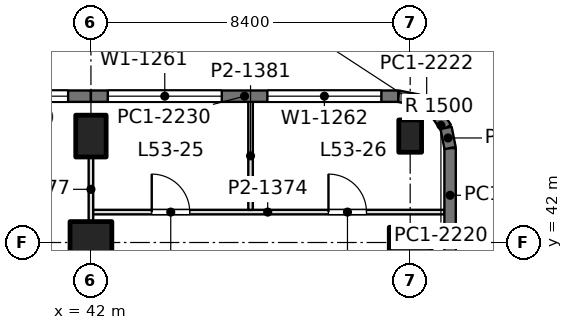
"""IFC4 building model, lengths in metres.
Left out: names, types, materials, properties, quantities, classifications, styles, units other than length and angle.
Written with IfcOpenShell. Run it as: python <this file> out.ifc"""

import sys

from ifc_helpers import new_model, si_unit, direction, frame, frame_2d, origin, origin_2d, place, context, subcontext, project, spatial, rectangle, extrude, element, fill, save


model = new_model("IFC4")
c1 = context("Model", 3, precision=1e-05, world=origin(), true_north=direction((0.0, 1.0)))
c2 = subcontext(c1, "Body", "Model", "MODEL_VIEW")
j1 = project(units=[si_unit("LENGTHUNIT", "METRE"), si_unit("PLANEANGLEUNIT", "RADIAN")], contexts=[c1])
p1 = place(None, origin())
s1 = spatial("IfcSite", under=j1, at=p1, CompositionType="ELEMENT")
p2 = place(p1, origin())
s2 = spatial("IfcBuilding", under=s1, at=p2, CompositionType="ELEMENT")
p3 = place(p2, frame((0.0, 0.0, 232.2)))
s3 = spatial("IfcBuildingStorey", under=s2, at=p3, CompositionType="ELEMENT", Elevation=232.2)
p4 = place(p3, frame((42.0, 42.0, 0.0), z_axis=(0.0, 0.0, 1.0), x_axis=(1.0, 0.0, 0.0)))
e1 = element("IfcColumn", 1, at=p4, inside=s3, PredefinedType="COLUMN", context=c2, shape_type="SweptSolid", body=[
    extrude(rectangle(XDim=1.1, YDim=1.1, at=origin_2d()), origin(), (0.0, 0.0, 1.0), 4.2),
])
for number, where, z_axis, x_axis in (
    (2, (42.0, 44.8, 0.0), (0.0, 0.0, 1.0), (1.0, 0.0, 0.0)),
    (3, (50.4, 42.0, 0.0), (0.0, 0.0, 1.0), (0.0, 1.0, 0.0)),
):
    element("IfcColumn", number, at=place(p3, frame(where, z_axis=z_axis, x_axis=x_axis)), inside=s3, PredefinedType="COLUMN", context=c2, shape_type="SweptSolid", body=[
        extrude(rectangle(XDim=0.8, YDim=1.1, at=origin_2d()), origin(), (0.0, 0.0, 1.0), 4.2),
    ])
p5 = place(p3, frame((50.4, 44.8, 0.0), z_axis=(0.0, 0.0, 1.0), x_axis=(1.0, 0.0, 0.0)))
e4 = element("IfcColumn", 4, at=p5, inside=s3, PredefinedType="COLUMN", context=c2, shape_type="SweptSolid", body=[
    extrude(rectangle(XDim=0.6, YDim=0.85, at=origin_2d()), origin(), (0.0, 0.0, 1.0), 4.2),
])
p6 = place(p3, frame((33.6, 45.85, 0.0), z_axis=(0.0, 0.0, 1.0), x_axis=(1.0, 0.0, 0.0)))
e5 = element("IfcWall", 5, at=p6, inside=s3, PredefinedType="SOLIDWALL", context=c2, shape_type="SweptSolid", body=[
    extrude(rectangle(XDim=8.4, YDim=0.3, at=frame_2d((4.2, 0.0))), origin(), (0.0, 0.0, 1.0), 4.05),
])
p7 = place(p6, frame((0.6, 0.0, 0.9)))
e6 = element("IfcOpeningElement", 6, at=p7, cuts=e5, PredefinedType="OPENING", context=c2, shape_type="SweptSolid", body=[
    extrude(rectangle(XDim=3.0, YDim=1.9, at=frame_2d((1.5, 0.95))), frame((0.0, 0.16, 0.0), z_axis=(0.0, -1.0, 0.0), x_axis=(1.0, 0.0, 0.0)), (0.0, 0.0, 1.0), 0.32),
])
p8 = place(p6, frame((4.8, 0.0, 0.9)))
e7 = element("IfcOpeningElement", 7, at=p8, cuts=e5, PredefinedType="OPENING", context=c2, shape_type="SweptSolid", body=[
    extrude(rectangle(XDim=3.0, YDim=1.9, at=frame_2d((1.5, 0.95))), frame((0.0, 0.16, 0.0), z_axis=(0.0, -1.0, 0.0), x_axis=(1.0, 0.0, 0.0)), (0.0, 0.0, 1.0), 0.32),
])
p9 = place(p3, frame((42.0, 45.85, 0.0), z_axis=(0.0, 0.0, 1.0), x_axis=(1.0, 0.0, 0.0)))
e8 = element("IfcWall", 8, at=p9, inside=s3, PredefinedType="SOLIDWALL", context=c2, shape_type="SweptSolid", body=[
    extrude(rectangle(XDim=8.085, YDim=0.3, at=frame_2d((4.042, 0.0))), origin(), (0.0, 0.0, 1.0), 4.05),
])
p10 = place(p9, frame((0.443, 0.0, 0.9)))
e9 = element("IfcOpeningElement", 9, at=p10, cuts=e8, PredefinedType="OPENING", context=c2, shape_type="SweptSolid", body=[
    extrude(rectangle(XDim=3.0, YDim=1.9, at=frame_2d((1.5, 0.95))), frame((0.0, 0.16, 0.0), z_axis=(0.0, -1.0, 0.0), x_axis=(1.0, 0.0, 0.0)), (0.0, 0.0, 1.0), 0.32),
])
p11 = place(p9, frame((4.643, 0.0, 0.9)))
e10 = element("IfcOpeningElement", 10, at=p11, cuts=e8, PredefinedType="OPENING", context=c2, shape_type="SweptSolid", body=[
    extrude(rectangle(XDim=3.0, YDim=1.9, at=frame_2d((1.5, 0.95))), frame((0.0, 0.16, 0.0), z_axis=(0.0, -1.0, 0.0), x_axis=(1.0, 0.0, 0.0)), (0.0, 0.0, 1.0), 0.32),
])
p12 = place(p3, frame((50.085, 45.85, 0.0), z_axis=(0.0, 0.0, 1.0), x_axis=(0.980702050465, -0.1955082817, 0.0)))
e11 = element("IfcWall", 11, at=p12, inside=s3, PredefinedType="SOLIDWALL", context=c2, shape_type="SweptSolid", body=[
    extrude(rectangle(XDim=0.541, YDim=0.3, at=frame_2d((0.271, 0.0))), origin(), (0.0, 0.0, 1.0), 4.05),
])
p13 = place(p3, frame((50.615, 45.744, 0.0), z_axis=(0.0, 0.0, 1.0), x_axis=(0.831692711774, -0.555236195849, 0.0)))
e12 = element("IfcWall", 12, at=p13, inside=s3, PredefinedType="SOLIDWALL", context=c2, shape_type="SweptSolid", body=[
    extrude(rectangle(XDim=0.525, YDim=0.3, at=frame_2d((0.263, 0.0))), origin(), (0.0, 0.0, 1.0), 4.05),
])
p14 = place(p3, frame((51.052, 45.453, 0.0), z_axis=(0.0, 0.0, 1.0), x_axis=(0.55534295404, -0.831621430339, 0.0)))
e13 = element("IfcWall", 13, at=p14, inside=s3, PredefinedType="SOLIDWALL", context=c2, shape_type="SweptSolid", body=[
    extrude(rectangle(XDim=0.526, YDim=0.3, at=frame_2d((0.263, 0.0))), origin(), (0.0, 0.0, 1.0), 4.05),
])
p15 = place(p3, frame((51.344, 45.015, 0.0), z_axis=(0.0, 0.0, 1.0), x_axis=(0.195073962632, -0.980788534345, 0.0)))
e14 = element("IfcWall", 14, at=p15, inside=s3, PredefinedType="SOLIDWALL", context=c2, shape_type="SweptSolid", body=[
    extrude(rectangle(XDim=0.541, YDim=0.3, at=frame_2d((0.271, 0.0))), origin(), (0.0, 0.0, 1.0), 4.05),
])
p16 = place(p3, frame((51.45, 44.485, 0.0), z_axis=(0.0, 0.0, 1.0), x_axis=(0.0, -1.0, 0.0)))
e15 = element("IfcWall", 15, at=p16, inside=s3, PredefinedType="SOLIDWALL", context=c2, shape_type="SweptSolid", body=[
    extrude(rectangle(XDim=2.485, YDim=0.3, at=frame_2d((1.243, 0.0))), origin(), (0.0, 0.0, 1.0), 4.05),
])
p17 = place(p3, frame((51.45, 42.0, 0.0), z_axis=(0.0, 0.0, 1.0), x_axis=(0.0, -1.0, 0.0)))
e16 = element("IfcWall", 16, at=p17, inside=s3, PredefinedType="SOLIDWALL", context=c2, shape_type="SweptSolid", body=[
    extrude(rectangle(XDim=4.275, YDim=0.3, at=frame_2d((2.137, 0.0))), origin(), (0.0, 0.0, 1.0), 4.05),
])
p18 = place(p17, frame((0.938, 0.0, 0.9)))
e17 = element("IfcOpeningElement", 17, at=p18, cuts=e16, PredefinedType="OPENING", context=c2, shape_type="SweptSolid", body=[
    extrude(rectangle(XDim=2.4, YDim=1.9, at=frame_2d((1.2, 0.95))), frame((0.0, 0.16, 0.0), z_axis=(0.0, -1.0, 0.0), x_axis=(1.0, 0.0, 0.0)), (0.0, 0.0, 1.0), 0.32),
])
p19 = place(p3, frame((42.0, 42.8, 0.0), z_axis=(0.0, 0.0, 1.0), x_axis=(1.0, 0.0, 0.0)))
e18 = element("IfcWall", 18, at=p19, inside=s3, PredefinedType="PARTITIONING", context=c2, shape_type="SweptSolid", body=[
    extrude(rectangle(XDim=9.302, YDim=0.12, at=frame_2d((4.651, 0.0))), origin(), (0.0, 0.0, 1.0), 3.56),
])
p20 = place(p19, frame((1.6, 0.0, 0.0)))
e19 = element("IfcOpeningElement", 19, at=p20, cuts=e18, PredefinedType="OPENING", context=c2, shape_type="SweptSolid", body=[
    extrude(rectangle(XDim=1.0, YDim=2.4, at=frame_2d((0.5, 1.2))), frame((0.0, 0.07, 0.0), z_axis=(0.0, -1.0, 0.0), x_axis=(1.0, 0.0, 0.0)), (0.0, 0.0, 1.0), 0.14),
])
p21 = place(p19, frame((6.25, 0.0, 0.0)))
e20 = element("IfcOpeningElement", 20, at=p21, cuts=e18, PredefinedType="OPENING", context=c2, shape_type="SweptSolid", body=[
    extrude(rectangle(XDim=1.0, YDim=2.4, at=frame_2d((0.5, 1.2))), frame((0.0, 0.07, 0.0), z_axis=(0.0, -1.0, 0.0), x_axis=(1.0, 0.0, 0.0)), (0.0, 0.0, 1.0), 0.14),
])
p22 = place(p3, frame((42.0, 42.548, 0.0), z_axis=(0.0, 0.0, 1.0), x_axis=(0.0, 1.0, 0.0)))
e21 = element("IfcWall", 21, at=p22, inside=s3, PredefinedType="PARTITIONING", context=c2, shape_type="SweptSolid", body=[
    extrude(rectangle(XDim=1.703, YDim=0.12, at=frame_2d((0.852, 0.0))), origin(), (0.0, 0.0, 1.0), 3.69),
])
p23 = place(p3, frame((46.2, 42.858, 0.0), z_axis=(0.0, 0.0, 1.0), x_axis=(0.0, 1.0, 0.0)))
e22 = element("IfcWall", 22, at=p23, inside=s3, PredefinedType="PARTITIONING", context=c2, shape_type="SweptSolid", body=[
    extrude(rectangle(XDim=2.844, YDim=0.12, at=frame_2d((1.422, 0.0))), origin(), (0.0, 0.0, 1.0), 3.56),
])
p24 = place(p8, origin())
e23 = element("IfcWindow", 23, at=p24, inside=s3, PartitioningType="SINGLE_PANEL", PredefinedType="WINDOW", context=c2, shape_type="SweptSolid", body=[
    extrude(rectangle(XDim=3.0, YDim=1.9, at=frame_2d((1.5, 0.95))), frame((0.0, 0.03, 0.0), z_axis=(0.0, -1.0, 0.0), x_axis=(1.0, 0.0, 0.0)), (0.0, 0.0, 1.0), 0.06),
])
fill(e7, e23)
p25 = place(p10, origin())
e24 = element("IfcWindow", 24, at=p25, inside=s3, PartitioningType="SINGLE_PANEL", PredefinedType="WINDOW", context=c2, shape_type="SweptSolid", body=[
    extrude(rectangle(XDim=3.0, YDim=1.9, at=frame_2d((1.5, 0.95))), frame((0.0, 0.03, 0.0), z_axis=(0.0, -1.0, 0.0), x_axis=(1.0, 0.0, 0.0)), (0.0, 0.0, 1.0), 0.06),
])
fill(e9, e24)
p26 = place(p11, origin())
e25 = element("IfcWindow", 25, at=p26, inside=s3, PartitioningType="SINGLE_PANEL", PredefinedType="WINDOW", context=c2, shape_type="SweptSolid", body=[
    extrude(rectangle(XDim=3.0, YDim=1.9, at=frame_2d((1.5, 0.95))), frame((0.0, 0.03, 0.0), z_axis=(0.0, -1.0, 0.0), x_axis=(1.0, 0.0, 0.0)), (0.0, 0.0, 1.0), 0.06),
])
fill(e10, e25)
p27 = place(p20, origin())
e26 = element("IfcDoor", 26, at=p27, inside=s3, OperationType="SINGLE_SWING_LEFT", PredefinedType="DOOR", context=c2, shape_type="SweptSolid", body=[
    extrude(rectangle(XDim=1.0, YDim=2.4, at=frame_2d((0.5, 1.2))), frame((0.0, 0.025, 0.0), z_axis=(0.0, -1.0, 0.0), x_axis=(1.0, 0.0, 0.0)), (0.0, 0.0, 1.0), 0.05),
])
fill(e19, e26)
p28 = place(p21, origin())
e27 = element("IfcDoor", 27, at=p28, inside=s3, OperationType="SINGLE_SWING_LEFT", PredefinedType="DOOR", context=c2, shape_type="SweptSolid", body=[
    extrude(rectangle(XDim=1.0, YDim=2.4, at=frame_2d((0.5, 1.2))), frame((0.0, 0.025, 0.0), z_axis=(0.0, -1.0, 0.0), x_axis=(1.0, 0.0, 0.0)), (0.0, 0.0, 1.0), 0.05),
])
fill(e20, e27)
save(model, sys.argv[1])
